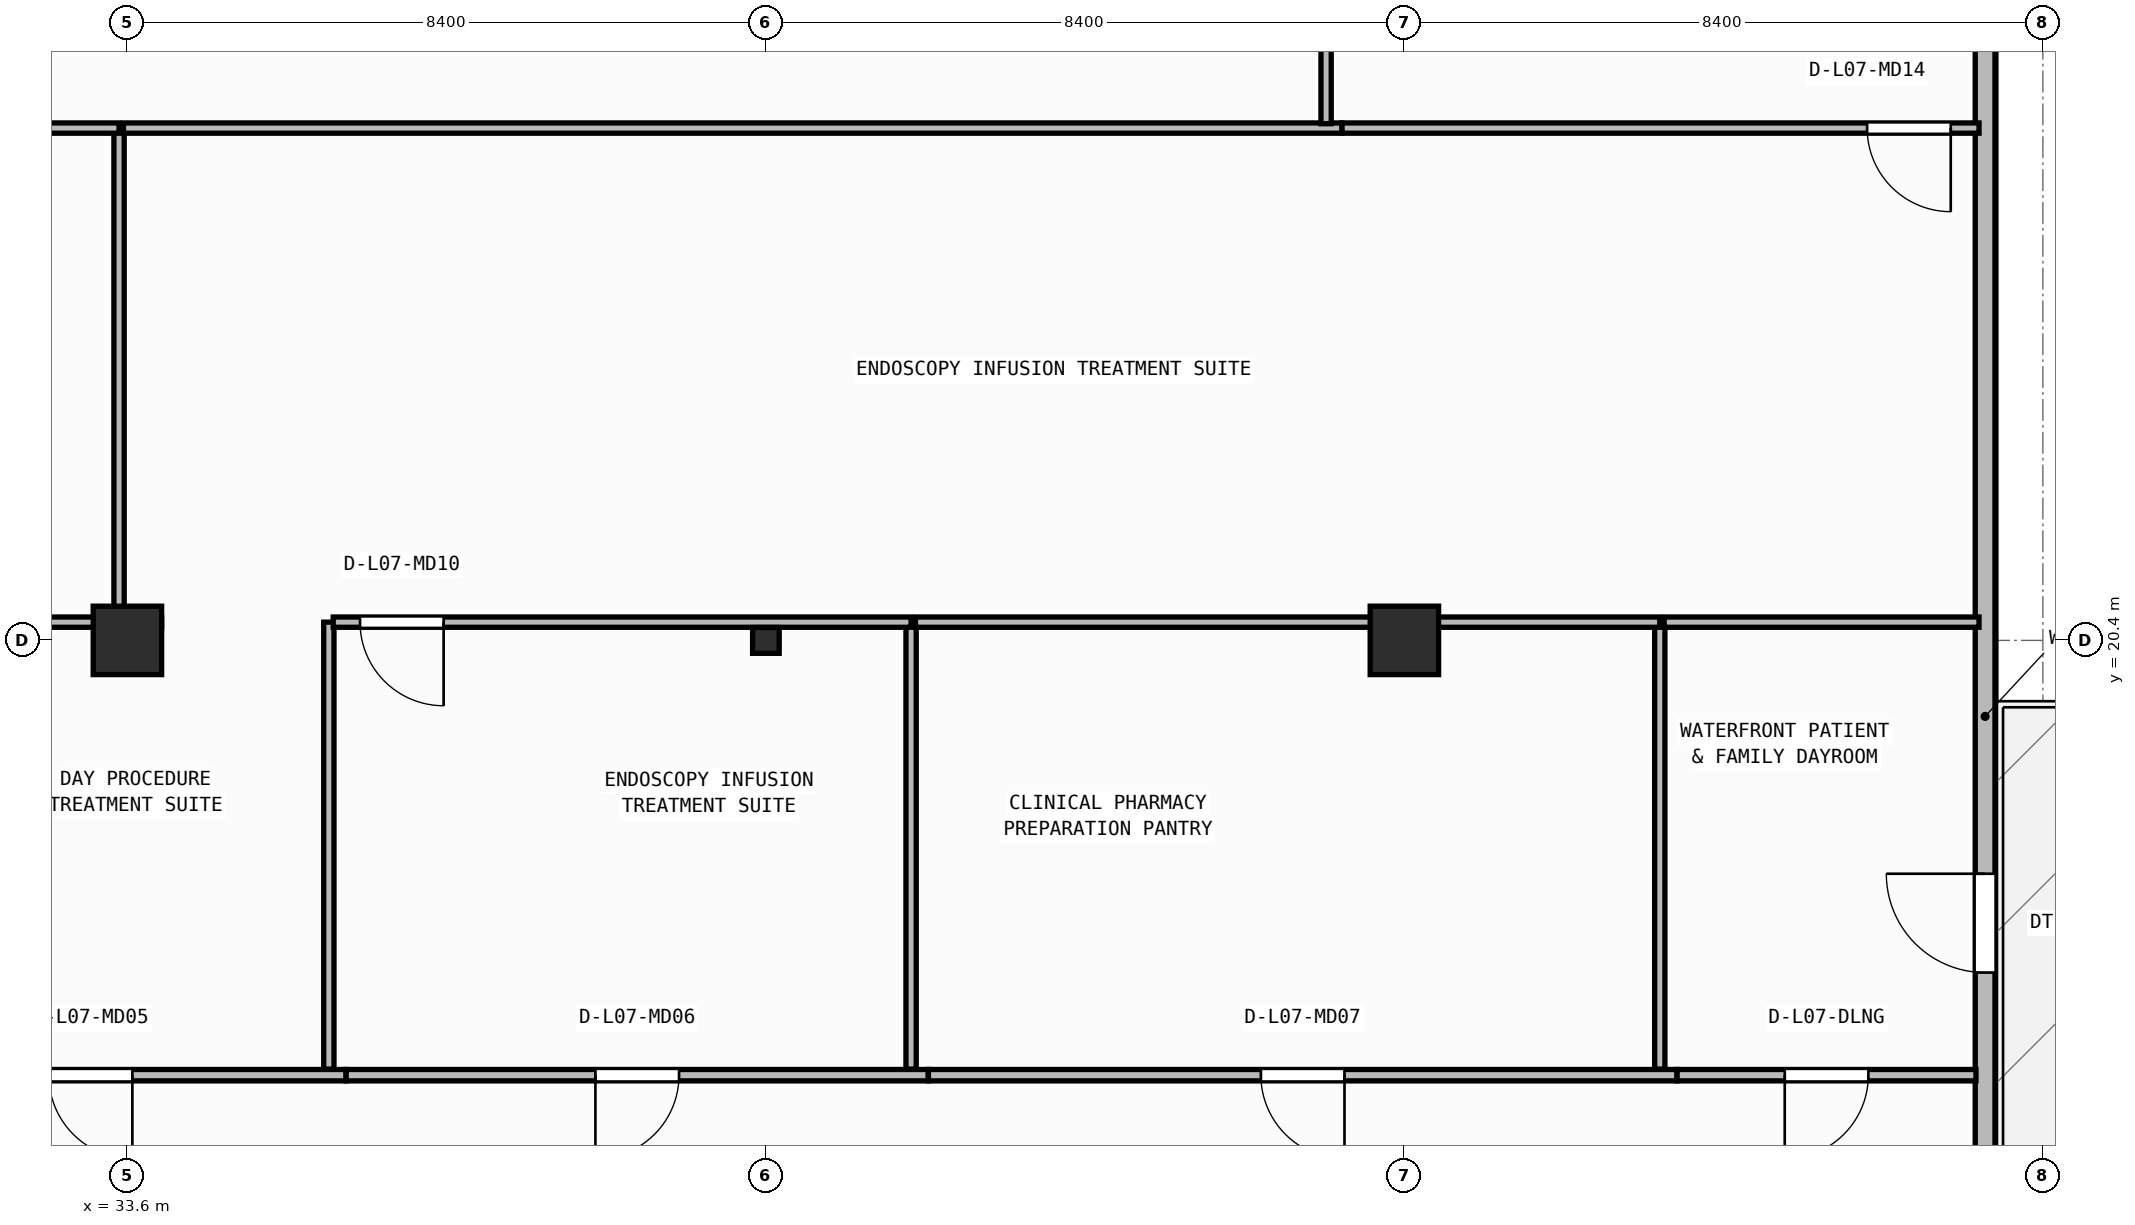
"""IFC4 building model, lengths in metres.
Left out: names, types, materials, properties, quantities, classifications, styles, units other than length and angle.
Written with IfcOpenShell. Run it as: python <this file> out.ifc"""

import sys

from ifc_helpers import new_model, si_unit, direction, frame, frame_2d, origin, origin_2d, place, context, subcontext, project, spatial, rectangle, i_section, extrude, element, fill, save


model = new_model("IFC4")
c1 = context("Model", 3, precision=1e-05, world=origin(), true_north=direction((0.0, 1.0)))
c2 = subcontext(c1, "Body", "Model", "MODEL_VIEW")
j1 = project(units=[si_unit("LENGTHUNIT", "METRE"), si_unit("PLANEANGLEUNIT", "RADIAN")], contexts=[c1])
p1 = place(None, origin())
s1 = spatial("IfcSite", under=j1, at=p1, CompositionType="ELEMENT")
p2 = place(p1, origin())
s2 = spatial("IfcBuilding", under=s1, at=p2, CompositionType="ELEMENT")
p3 = place(p2, frame((0.0, 0.0, 30.4)))
s3 = spatial("IfcBuildingStorey", under=s2, at=p3, CompositionType="ELEMENT", Elevation=30.4)
p4 = place(p3, frame((33.6, 20.4, 0.0), z_axis=(0.0, 0.0, 1.0), x_axis=(1.0, 0.0, 0.0)))
e1 = element("IfcColumn", 1, at=p4, inside=s3, PredefinedType="COLUMN", context=c2, shape_type="SweptSolid", body=[
    extrude(rectangle(XDim=0.9, YDim=0.9, at=origin_2d()), origin(), (0.0, 0.0, 1.0), 3.95),
])
p5 = place(p3, frame((42.0, 20.4, 0.0), z_axis=(0.0, 0.0, 1.0), x_axis=(1.0, 0.0, 0.0)))
e2 = element("IfcColumn", 2, at=p5, inside=s3, PredefinedType="COLUMN", context=c2, shape_type="SweptSolid", body=[
    extrude(i_section(OverallWidth=0.35, OverallDepth=0.34, WebThickness=0.016, FlangeThickness=0.028, at=origin_2d()), origin(), (0.0, 0.0, 1.0), 3.95),
])
p6 = place(p3, frame((50.4, 20.4, 0.0), z_axis=(0.0, 0.0, 1.0), x_axis=(1.0, 0.0, 0.0)))
e3 = element("IfcColumn", 3, at=p6, inside=s3, PredefinedType="COLUMN", context=c2, shape_type="SweptSolid", body=[
    extrude(rectangle(XDim=0.9, YDim=0.9, at=origin_2d()), origin(), (0.0, 0.0, 1.0), 3.95),
])
p7 = place(p3, frame((58.04, 7.16, 0.0), z_axis=(0.0, 0.0, 1.0), x_axis=(0.0, 1.0, 0.0)))
e4 = element("IfcWall", 4, at=p7, inside=s3, PredefinedType="STANDARD", context=c2, shape_type="SweptSolid", body=[
    extrude(rectangle(XDim=24.48, YDim=0.26, at=frame_2d((12.24, 0.0))), origin(), (0.0, 0.0, 1.0), 3.71),
])
p8 = place(p7, frame((8.87, 0.0, 0.0)))
e5 = element("IfcOpeningElement", 5, at=p8, cuts=e4, PredefinedType="OPENING", context=c2, shape_type="SweptSolid", body=[
    extrude(rectangle(XDim=1.3, YDim=2.15, at=frame_2d((0.65, 1.075))), frame((0.0, 0.14, 0.0), z_axis=(0.0, -1.0, 0.0), x_axis=(1.0, 0.0, 0.0)), (0.0, 0.0, 1.0), 0.28),
])
p9 = place(p3, frame((36.476, 14.68, 0.0), z_axis=(0.0, 0.0, 1.0), x_axis=(-1.0, 0.0, 0.0)))
e6 = element("IfcWall", 6, at=p9, inside=s3, PredefinedType="PARTITIONING", context=c2, shape_type="SweptSolid", body=[
    extrude(rectangle(XDim=6.722, YDim=0.15, at=frame_2d((3.361, 0.0))), origin(), (0.0, 0.0, 1.0), 3.71),
])
p10 = place(p9, frame((2.811, 0.0, 0.0)))
e7 = element("IfcOpeningElement", 7, at=p10, cuts=e6, PredefinedType="OPENING", context=c2, shape_type="SweptSolid", body=[
    extrude(rectangle(XDim=1.1, YDim=2.1, at=frame_2d((0.55, 1.05))), frame((0.0, 0.085, 0.0), z_axis=(0.0, -1.0, 0.0), x_axis=(1.0, 0.0, 0.0)), (0.0, 0.0, 1.0), 0.17),
])
p11 = place(p3, frame((44.136, 14.68, 0.0), z_axis=(0.0, 0.0, 1.0), x_axis=(-1.0, 0.0, 0.0)))
e8 = element("IfcWall", 8, at=p11, inside=s3, PredefinedType="PARTITIONING", context=c2, shape_type="SweptSolid", body=[
    extrude(rectangle(XDim=7.658, YDim=0.15, at=frame_2d((3.829, 0.0))), origin(), (0.0, 0.0, 1.0), 3.71),
])
p12 = place(p11, frame((3.279, 0.0, 0.0)))
e9 = element("IfcOpeningElement", 9, at=p12, cuts=e8, PredefinedType="OPENING", context=c2, shape_type="SweptSolid", body=[
    extrude(rectangle(XDim=1.1, YDim=2.1, at=frame_2d((0.55, 1.05))), frame((0.0, 0.085, 0.0), z_axis=(0.0, -1.0, 0.0), x_axis=(1.0, 0.0, 0.0)), (0.0, 0.0, 1.0), 0.17),
])
p13 = place(p3, frame((53.986, 14.68, 0.0), z_axis=(0.0, 0.0, 1.0), x_axis=(-1.0, 0.0, 0.0)))
e10 = element("IfcWall", 10, at=p13, inside=s3, PredefinedType="PARTITIONING", context=c2, shape_type="SweptSolid", body=[
    extrude(rectangle(XDim=9.848, YDim=0.15, at=frame_2d((4.924, 0.0))), origin(), (0.0, 0.0, 1.0), 3.71),
])
p14 = place(p13, frame((4.374, 0.0, 0.0)))
e11 = element("IfcOpeningElement", 11, at=p14, cuts=e10, PredefinedType="OPENING", context=c2, shape_type="SweptSolid", body=[
    extrude(rectangle(XDim=1.1, YDim=2.1, at=frame_2d((0.55, 1.05))), frame((0.0, 0.085, 0.0), z_axis=(0.0, -1.0, 0.0), x_axis=(1.0, 0.0, 0.0)), (0.0, 0.0, 1.0), 0.17),
])
p15 = place(p3, frame((57.92, 14.68, 0.0), z_axis=(0.0, 0.0, 1.0), x_axis=(-1.0, 0.0, 0.0)))
e12 = element("IfcWall", 12, at=p15, inside=s3, PredefinedType="PARTITIONING", context=c2, shape_type="SweptSolid", body=[
    extrude(rectangle(XDim=3.932, YDim=0.15, at=frame_2d((1.966, 0.0))), origin(), (0.0, 0.0, 1.0), 3.71),
])
p16 = place(p15, frame((1.416, 0.0, 0.0)))
e13 = element("IfcOpeningElement", 13, at=p16, cuts=e12, PredefinedType="OPENING", context=c2, shape_type="SweptSolid", body=[
    extrude(rectangle(XDim=1.1, YDim=2.1, at=frame_2d((0.55, 1.05))), frame((0.0, 0.085, 0.0), z_axis=(0.0, -1.0, 0.0), x_axis=(1.0, 0.0, 0.0)), (0.0, 0.0, 1.0), 0.17),
])
p17 = place(p3, frame((36.25, 14.76, 0.0), z_axis=(0.0, 0.0, 1.0), x_axis=(0.0, 1.0, 0.0)))
e14 = element("IfcWall", 14, at=p17, inside=s3, PredefinedType="PARTITIONING", context=c2, shape_type="SweptSolid", body=[
    extrude(rectangle(XDim=5.88, YDim=0.135, at=frame_2d((2.94, 0.0))), origin(), (0.0, 0.0, 1.0), 3.71),
])
p18 = place(p3, frame((34.05, 20.64, 0.0), z_axis=(0.0, 0.0, 1.0), x_axis=(-1.0, 0.0, 0.0)))
e15 = element("IfcWall", 15, at=p18, inside=s3, PredefinedType="PARTITIONING", context=c2, shape_type="SweptSolid", body=[
    extrude(rectangle(XDim=4.085, YDim=0.135, at=frame_2d((2.042, 0.0))), origin(), (0.0, 0.0, 1.0), 3.073),
])
p19 = place(p3, frame((43.91, 14.76, 0.0), z_axis=(0.0, 0.0, 1.0), x_axis=(0.0, 1.0, 0.0)))
e16 = element("IfcWall", 16, at=p19, inside=s3, PredefinedType="PARTITIONING", context=c2, shape_type="SweptSolid", body=[
    extrude(rectangle(XDim=5.88, YDim=0.135, at=frame_2d((2.94, 0.0))), origin(), (0.0, 0.0, 1.0), 3.71),
])
p20 = place(p3, frame((43.91, 20.64, 0.0), z_axis=(0.0, 0.0, 1.0), x_axis=(-1.0, 0.0, 0.0)))
e17 = element("IfcWall", 17, at=p20, inside=s3, PredefinedType="PARTITIONING", context=c2, shape_type="SweptSolid", body=[
    extrude(rectangle(XDim=7.602, YDim=0.135, at=frame_2d((3.801, 0.0))), origin(), (0.0, 0.0, 1.0), 3.073),
])
p21 = place(p20, frame((6.15, 0.0, 0.0)))
e18 = element("IfcOpeningElement", 18, at=p21, cuts=e17, PredefinedType="OPENING", context=c2, shape_type="SweptSolid", body=[
    extrude(rectangle(XDim=1.1, YDim=2.1, at=frame_2d((0.55, 1.05))), frame((0.0, 0.077, 0.0), z_axis=(0.0, -1.0, 0.0), x_axis=(1.0, 0.0, 0.0)), (0.0, 0.0, 1.0), 0.155),
])
p22 = place(p3, frame((53.76, 14.76, 0.0), z_axis=(0.0, 0.0, 1.0), x_axis=(0.0, 1.0, 0.0)))
e19 = element("IfcWall", 19, at=p22, inside=s3, PredefinedType="PARTITIONING", context=c2, shape_type="SweptSolid", body=[
    extrude(rectangle(XDim=5.88, YDim=0.135, at=frame_2d((2.94, 0.0))), origin(), (0.0, 0.0, 1.0), 3.71),
])
p23 = place(p3, frame((53.76, 20.64, 0.0), z_axis=(0.0, 0.0, 1.0), x_axis=(-1.0, 0.0, 0.0)))
e20 = element("IfcWall", 20, at=p23, inside=s3, PredefinedType="PARTITIONING", context=c2, shape_type="SweptSolid", body=[
    extrude(rectangle(XDim=9.792, YDim=0.135, at=frame_2d((4.896, 0.0))), origin(), (0.0, 0.0, 1.0), 3.073),
])
p24 = place(p3, frame((57.96, 20.64, 0.0), z_axis=(0.0, 0.0, 1.0), x_axis=(-1.0, 0.0, 0.0)))
e21 = element("IfcWall", 21, at=p24, inside=s3, PredefinedType="PARTITIONING", context=c2, shape_type="SweptSolid", body=[
    extrude(rectangle(XDim=4.143, YDim=0.135, at=frame_2d((2.071, 0.0))), origin(), (0.0, 0.0, 1.0), 3.71),
])
p25 = place(p3, frame((33.49, 20.698, 0.0), z_axis=(0.0, 0.0, 1.0), x_axis=(0.0, 1.0, 0.0)))
e22 = element("IfcWall", 22, at=p25, inside=s3, PredefinedType="PARTITIONING", context=c2, shape_type="SweptSolid", body=[
    extrude(rectangle(XDim=6.442, YDim=0.135, at=frame_2d((3.221, 0.0))), origin(), (0.0, 0.0, 1.0), 3.073),
])
p26 = place(p3, frame((33.49, 27.14, 0.0), z_axis=(0.0, 0.0, 1.0), x_axis=(-1.0, 0.0, 0.0)))
e23 = element("IfcWall", 23, at=p26, inside=s3, PredefinedType="PARTITIONING", context=c2, shape_type="SweptSolid", body=[
    extrude(rectangle(XDim=4.24, YDim=0.135, at=frame_2d((2.12, 0.0))), origin(), (0.0, 0.0, 1.0), 3.71),
])
p27 = place(p26, frame((2.872, 0.0, 0.0)))
e24 = element("IfcOpeningElement", 24, at=p27, cuts=e23, PredefinedType="OPENING", context=c2, shape_type="SweptSolid", body=[
    extrude(rectangle(XDim=1.1, YDim=2.1, at=frame_2d((0.55, 1.05))), frame((0.0, 0.077, 0.0), z_axis=(0.0, -1.0, 0.0), x_axis=(1.0, 0.0, 0.0)), (0.0, 0.0, 1.0), 0.155),
])
p28 = place(p3, frame((49.577, 27.14, 0.0), z_axis=(0.0, 0.0, 1.0), x_axis=(-1.0, 0.0, 0.0)))
e25 = element("IfcWall", 25, at=p28, inside=s3, PredefinedType="PARTITIONING", context=c2, shape_type="SweptSolid", body=[
    extrude(rectangle(XDim=16.03, YDim=0.135, at=frame_2d((8.015, 0.0))), origin(), (0.0, 0.0, 1.0), 3.71),
])
p29 = place(p3, frame((57.96, 27.14, 0.0), z_axis=(0.0, 0.0, 1.0), x_axis=(-1.0, 0.0, 0.0)))
e26 = element("IfcWall", 26, at=p29, inside=s3, PredefinedType="PARTITIONING", context=c2, shape_type="SweptSolid", body=[
    extrude(rectangle(XDim=8.38, YDim=0.135, at=frame_2d((4.19, 0.0))), origin(), (0.0, 0.0, 1.0), 3.71),
])
p30 = place(p29, frame((0.372, 0.0, 0.0)))
e27 = element("IfcOpeningElement", 27, at=p30, cuts=e26, PredefinedType="OPENING", context=c2, shape_type="SweptSolid", body=[
    extrude(rectangle(XDim=1.1, YDim=2.1, at=frame_2d((0.55, 1.05))), frame((0.0, 0.077, 0.0), z_axis=(0.0, -1.0, 0.0), x_axis=(1.0, 0.0, 0.0)), (0.0, 0.0, 1.0), 0.155),
])
p31 = place(p3, frame((49.37, 27.198, 0.0), z_axis=(0.0, 0.0, 1.0), x_axis=(0.0, 1.0, 0.0)))
e28 = element("IfcWall", 28, at=p31, inside=s3, PredefinedType="PARTITIONING", context=c2, shape_type="SweptSolid", body=[
    extrude(rectangle(XDim=5.914, YDim=0.135, at=frame_2d((2.957, 0.0))), origin(), (0.0, 0.0, 1.0), 3.71),
])
p32 = place(p8, origin())
e29 = element("IfcDoor", 29, at=p32, inside=s3, OperationType="SINGLE_SWING_RIGHT", PredefinedType="DOOR", context=c2, shape_type="SweptSolid", body=[
    extrude(rectangle(XDim=1.3, YDim=2.15, at=frame_2d((0.65, 1.075))), frame((0.0, 0.025, 0.0), z_axis=(0.0, -1.0, 0.0), x_axis=(1.0, 0.0, 0.0)), (0.0, 0.0, 1.0), 0.05),
])
fill(e5, e29)
p33 = place(p10, origin())
e30 = element("IfcDoor", 30, at=p33, inside=s3, OperationType="SINGLE_SWING_LEFT", PredefinedType="DOOR", context=c2, shape_type="SweptSolid", body=[
    extrude(rectangle(XDim=1.1, YDim=2.1, at=frame_2d((0.55, 1.05))), frame((0.0, 0.025, 0.0), z_axis=(0.0, -1.0, 0.0), x_axis=(1.0, 0.0, 0.0)), (0.0, 0.0, 1.0), 0.05),
])
fill(e7, e30)
p34 = place(p12, origin())
e31 = element("IfcDoor", 31, at=p34, inside=s3, OperationType="SINGLE_SWING_RIGHT", PredefinedType="DOOR", context=c2, shape_type="SweptSolid", body=[
    extrude(rectangle(XDim=1.1, YDim=2.1, at=frame_2d((0.55, 1.05))), frame((0.0, 0.025, 0.0), z_axis=(0.0, -1.0, 0.0), x_axis=(1.0, 0.0, 0.0)), (0.0, 0.0, 1.0), 0.05),
])
fill(e9, e31)
p35 = place(p14, origin())
e32 = element("IfcDoor", 32, at=p35, inside=s3, OperationType="SINGLE_SWING_LEFT", PredefinedType="DOOR", context=c2, shape_type="SweptSolid", body=[
    extrude(rectangle(XDim=1.1, YDim=2.1, at=frame_2d((0.55, 1.05))), frame((0.0, 0.025, 0.0), z_axis=(0.0, -1.0, 0.0), x_axis=(1.0, 0.0, 0.0)), (0.0, 0.0, 1.0), 0.05),
])
fill(e11, e32)
p36 = place(p16, origin())
e33 = element("IfcDoor", 33, at=p36, inside=s3, OperationType="SINGLE_SWING_RIGHT", PredefinedType="DOOR", context=c2, shape_type="SweptSolid", body=[
    extrude(rectangle(XDim=1.1, YDim=2.1, at=frame_2d((0.55, 1.05))), frame((0.0, 0.025, 0.0), z_axis=(0.0, -1.0, 0.0), x_axis=(1.0, 0.0, 0.0)), (0.0, 0.0, 1.0), 0.05),
])
fill(e13, e33)
p37 = place(p21, origin())
e34 = element("IfcDoor", 34, at=p37, inside=s3, OperationType="SINGLE_SWING_LEFT", PredefinedType="DOOR", context=c2, shape_type="SweptSolid", body=[
    extrude(rectangle(XDim=1.1, YDim=2.1, at=frame_2d((0.55, 1.05))), frame((0.0, 0.025, 0.0), z_axis=(0.0, -1.0, 0.0), x_axis=(1.0, 0.0, 0.0)), (0.0, 0.0, 1.0), 0.05),
])
fill(e18, e34)
p38 = place(p30, origin())
e35 = element("IfcDoor", 35, at=p38, inside=s3, OperationType="SINGLE_SWING_LEFT", PredefinedType="DOOR", context=c2, shape_type="SweptSolid", body=[
    extrude(rectangle(XDim=1.1, YDim=2.1, at=frame_2d((0.55, 1.05))), frame((0.0, 0.025, 0.0), z_axis=(0.0, -1.0, 0.0), x_axis=(1.0, 0.0, 0.0)), (0.0, 0.0, 1.0), 0.05),
])
fill(e27, e35)
save(model, sys.argv[1])
